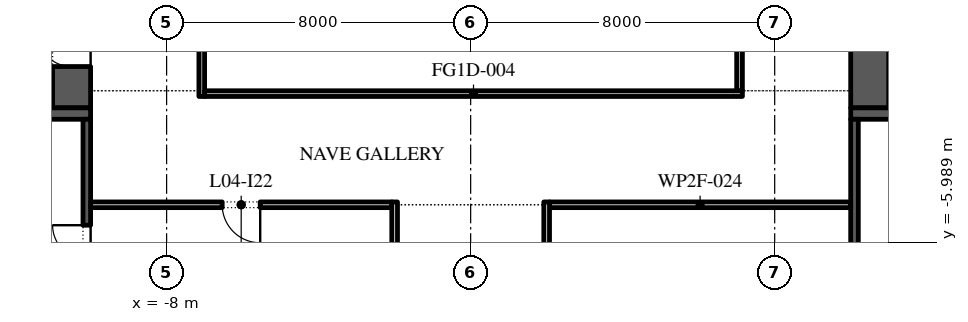
"""IFC4 building model, lengths in metres.
Left out: names, types, materials, properties, quantities, classifications, styles, units other than length and angle.
Written with IfcOpenShell. Run it as: python <this file> out.ifc"""

import sys

from ifc_helpers import new_model, si_unit, direction, frame, frame_2d, origin, place, context, subcontext, project, spatial, rectangle, extrude, element, fill, save


model = new_model("IFC4")
c1 = context("Model", 3, precision=1e-05, world=origin(), true_north=direction((0.0, 1.0)))
c2 = subcontext(c1, "Body", "Model", "MODEL_VIEW")
j1 = project(units=[si_unit("LENGTHUNIT", "METRE"), si_unit("PLANEANGLEUNIT", "RADIAN")], contexts=[c1])
p1 = place(None, origin())
s1 = spatial("IfcSite", under=j1, at=p1, CompositionType="ELEMENT")
p2 = place(p1, origin())
s2 = spatial("IfcBuilding", under=s1, at=p2, CompositionType="ELEMENT")
p3 = place(p2, frame((0.0, 0.0, 24.0)))
s3 = spatial("IfcBuildingStorey", under=s2, at=p3, CompositionType="ELEMENT", Elevation=24.0)
p4 = place(p3, frame((-7.075, -2.15, 0.0), z_axis=(0.0, 0.0, 1.0), x_axis=(0.0, 1.0, 0.0)))
e1 = element("IfcWall", 1, at=p4, inside=s3, PredefinedType="STANDARD", context=c2, shape_type="SweptSolid", body=[
    extrude(rectangle(XDim=18.3, YDim=0.15, at=frame_2d((9.15, 0.0))), origin(), (0.0, 0.0, 1.0), 4.5),
])
p5 = place(p3, frame((7.075, 16.15, 0.0), z_axis=(0.0, 0.0, 1.0), x_axis=(0.0, -1.0, 0.0)))
e2 = element("IfcWall", 2, at=p5, inside=s3, PredefinedType="STANDARD", context=c2, shape_type="SweptSolid", body=[
    extrude(rectangle(XDim=18.15, YDim=0.15, at=frame_2d((9.075, 0.0))), origin(), (0.0, 0.0, 1.0), 4.5),
])
p6 = place(p3, frame((7.15, -2.075, 0.0), z_axis=(0.0, 0.0, 1.0), x_axis=(-1.0, 0.0, 0.0)))
e3 = element("IfcWall", 3, at=p6, inside=s3, PredefinedType="STANDARD", context=c2, shape_type="SweptSolid", body=[
    extrude(rectangle(XDim=14.15, YDim=0.15, at=frame_2d((7.075, 0.0))), origin(), (0.0, 0.0, 1.0), 3.52),
])
p7 = place(p3, frame((-10.5, -2.45, 0.0), z_axis=(0.0, 0.0, 1.0), x_axis=(0.0, 1.0, 0.0)))
e4 = element("IfcWall", 4, at=p7, inside=s3, PredefinedType="SHEAR", context=c2, shape_type="SweptSolid", body=[
    extrude(rectangle(XDim=27.9, YDim=1.0, at=frame_2d((13.95, 0.0))), origin(), (0.0, 0.0, 1.0), 4.5),
])
p8 = place(p7, frame((23.65, 0.0, 0.0)))
e5 = element("IfcOpeningElement", 5, at=p8, cuts=e4, PredefinedType="OPENING", context=c2, shape_type="SweptSolid", body=[
    extrude(rectangle(XDim=2.4, YDim=2.1, at=frame_2d((1.2, 1.05))), frame((0.0, 0.51, 0.0), z_axis=(0.0, -1.0, 0.0), x_axis=(1.0, 0.0, 0.0)), (0.0, 0.0, 1.0), 1.02),
])
p9 = place(p7, frame((1.087, 0.0, 0.0)))
e6 = element("IfcOpeningElement", 6, at=p9, cuts=e4, PredefinedType="OPENING", context=c2, shape_type="SweptSolid", body=[
    extrude(rectangle(XDim=0.9, YDim=2.1, at=frame_2d((0.45, 1.05))), frame((0.0, 0.51, 0.0), z_axis=(0.0, -1.0, 0.0), x_axis=(1.0, 0.0, 0.0)), (0.0, 0.0, 1.0), 1.02),
])
p10 = place(p7, frame((4.312, 0.0, 0.0)))
e7 = element("IfcOpeningElement", 7, at=p10, cuts=e4, PredefinedType="OPENING", context=c2, shape_type="SweptSolid", body=[
    extrude(rectangle(XDim=0.9, YDim=2.1, at=frame_2d((0.45, 1.05))), frame((0.0, 0.51, 0.0), z_axis=(0.0, -1.0, 0.0), x_axis=(1.0, 0.0, 0.0)), (0.0, 0.0, 1.0), 1.02),
])
p11 = place(p3, frame((-22.0, -2.6, 0.0), z_axis=(0.0, 0.0, 1.0), x_axis=(1.0, 0.0, 0.0)))
e8 = element("IfcWall", 8, at=p11, inside=s3, PredefinedType="SHEAR", context=c2, shape_type="SweptSolid", body=[
    extrude(rectangle(XDim=12.0, YDim=0.3, at=frame_2d((6.0, 0.0))), origin(), (0.0, 0.0, 1.0), 4.5),
])
p12 = place(p3, frame((-10.1, -15.8, 0.0), z_axis=(0.0, 0.0, 1.0), x_axis=(0.0, 1.0, 0.0)))
e9 = element("IfcWall", 9, at=p12, inside=s3, PredefinedType="SHEAR", context=c2, shape_type="SweptSolid", body=[
    extrude(rectangle(XDim=13.05, YDim=0.2, at=frame_2d((6.525, 0.0))), origin(), (0.0, 0.0, 1.0), 4.5),
])
p13 = place(p12, frame((2.762, 0.0, 0.0)))
e10 = element("IfcOpeningElement", 10, at=p13, cuts=e9, PredefinedType="OPENING", context=c2, shape_type="SweptSolid", body=[
    extrude(rectangle(XDim=0.9, YDim=2.1, at=frame_2d((0.45, 1.05))), frame((0.0, 0.11, 0.0), z_axis=(0.0, -1.0, 0.0), x_axis=(1.0, 0.0, 0.0)), (0.0, 0.0, 1.0), 0.22),
])
p14 = place(p12, frame((9.363, 0.0, 0.0)))
e11 = element("IfcOpeningElement", 11, at=p14, cuts=e9, PredefinedType="OPENING", context=c2, shape_type="SweptSolid", body=[
    extrude(rectangle(XDim=0.9, YDim=2.1, at=frame_2d((0.45, 1.05))), frame((0.0, 0.11, 0.0), z_axis=(0.0, -1.0, 0.0), x_axis=(1.0, 0.0, 0.0)), (0.0, 0.0, 1.0), 0.22),
])
p15 = place(p3, frame((10.5, -2.45, 0.0), z_axis=(0.0, 0.0, 1.0), x_axis=(0.0, 1.0, 0.0)))
e12 = element("IfcWall", 12, at=p15, inside=s3, PredefinedType="SHEAR", context=c2, shape_type="SweptSolid", body=[
    extrude(rectangle(XDim=27.9, YDim=1.0, at=frame_2d((13.95, 0.0))), origin(), (0.0, 0.0, 1.0), 4.5),
])
p16 = place(p15, frame((23.65, 0.0, 0.0)))
e13 = element("IfcOpeningElement", 13, at=p16, cuts=e12, PredefinedType="OPENING", context=c2, shape_type="SweptSolid", body=[
    extrude(rectangle(XDim=2.4, YDim=2.1, at=frame_2d((1.2, 1.05))), frame((0.0, 0.51, 0.0), z_axis=(0.0, -1.0, 0.0), x_axis=(1.0, 0.0, 0.0)), (0.0, 0.0, 1.0), 1.02),
])
p17 = place(p15, frame((2.7, 0.0, 0.0)))
e14 = element("IfcOpeningElement", 14, at=p17, cuts=e12, PredefinedType="OPENING", context=c2, shape_type="SweptSolid", body=[
    extrude(rectangle(XDim=0.9, YDim=2.1, at=frame_2d((0.45, 1.05))), frame((0.0, 0.51, 0.0), z_axis=(0.0, -1.0, 0.0), x_axis=(1.0, 0.0, 0.0)), (0.0, 0.0, 1.0), 1.02),
])
p18 = place(p3, frame((10.0, -2.6, 0.0), z_axis=(0.0, 0.0, 1.0), x_axis=(1.0, 0.0, 0.0)))
e15 = element("IfcWall", 15, at=p18, inside=s3, PredefinedType="SHEAR", context=c2, shape_type="SweptSolid", body=[
    extrude(rectangle(XDim=12.0, YDim=0.3, at=frame_2d((6.0, 0.0))), origin(), (0.0, 0.0, 1.0), 4.5),
])
p19 = place(p3, frame((10.1, -15.8, 0.0), z_axis=(0.0, 0.0, 1.0), x_axis=(0.0, 1.0, 0.0)))
e16 = element("IfcWall", 16, at=p19, inside=s3, PredefinedType="SHEAR", context=c2, shape_type="SweptSolid", body=[
    extrude(rectangle(XDim=13.05, YDim=0.2, at=frame_2d((6.525, 0.0))), origin(), (0.0, 0.0, 1.0), 4.5),
])
p20 = place(p19, frame((4.462, 0.0, 0.0)))
e17 = element("IfcOpeningElement", 17, at=p20, cuts=e16, PredefinedType="OPENING", context=c2, shape_type="SweptSolid", body=[
    extrude(rectangle(XDim=0.9, YDim=2.1, at=frame_2d((0.45, 1.05))), frame((0.0, 0.11, 0.0), z_axis=(0.0, -1.0, 0.0), x_axis=(1.0, 0.0, 0.0)), (0.0, 0.0, 1.0), 0.22),
])
p21 = place(p3, frame((-10.0, -5.0, 0.0), z_axis=(0.0, 0.0, 1.0), x_axis=(1.0, 0.0, 0.0)))
e18 = element("IfcWall", 18, at=p21, inside=s3, PredefinedType="PARTITIONING", context=c2, shape_type="SweptSolid", body=[
    extrude(rectangle(XDim=7.925, YDim=0.15, at=frame_2d((3.962, 0.0))), origin(), (0.0, 0.0, 1.0), 4.5),
])
p22 = place(p21, frame((3.462, 0.0, 0.0)))
e19 = element("IfcOpeningElement", 19, at=p22, cuts=e18, PredefinedType="OPENING", context=c2, shape_type="SweptSolid", body=[
    extrude(rectangle(XDim=1.0, YDim=2.1, at=frame_2d((0.5, 1.05))), frame((0.0, 0.085, 0.0), z_axis=(0.0, -1.0, 0.0), x_axis=(1.0, 0.0, 0.0)), (0.0, 0.0, 1.0), 0.17),
])
p23 = place(p3, frame((2.075, -5.0, 0.0), z_axis=(0.0, 0.0, 1.0), x_axis=(1.0, 0.0, 0.0)))
e20 = element("IfcWall", 20, at=p23, inside=s3, PredefinedType="PARTITIONING", context=c2, shape_type="SweptSolid", body=[
    extrude(rectangle(XDim=7.925, YDim=0.15, at=frame_2d((3.962, 0.0))), origin(), (0.0, 0.0, 1.0), 4.5),
])
p24 = place(p3, frame((-2.0, -12.0, 0.0), z_axis=(0.0, 0.0, 1.0), x_axis=(0.0, 1.0, 0.0)))
e21 = element("IfcWall", 21, at=p24, inside=s3, PredefinedType="PARTITIONING", context=c2, shape_type="SweptSolid", body=[
    extrude(rectangle(XDim=7.075, YDim=0.15, at=frame_2d((3.538, 0.0))), origin(), (0.0, 0.0, 1.0), 4.5),
])
p25 = place(p3, frame((2.0, -14.0, 0.0), z_axis=(0.0, 0.0, 1.0), x_axis=(0.0, 1.0, 0.0)))
e22 = element("IfcWall", 22, at=p25, inside=s3, PredefinedType="PARTITIONING", context=c2, shape_type="SweptSolid", body=[
    extrude(rectangle(XDim=9.075, YDim=0.15, at=frame_2d((4.538, 0.0))), origin(), (0.0, 0.0, 1.0), 4.5),
])
p26 = place(p25, frame((4.038, 0.0, 0.0)))
e23 = element("IfcOpeningElement", 23, at=p26, cuts=e22, PredefinedType="OPENING", context=c2, shape_type="SweptSolid", body=[
    extrude(rectangle(XDim=1.0, YDim=2.1, at=frame_2d((0.5, 1.05))), frame((0.0, 0.085, 0.0), z_axis=(0.0, -1.0, 0.0), x_axis=(1.0, 0.0, 0.0)), (0.0, 0.0, 1.0), 0.17),
])
p27 = place(p9, origin())
e24 = element("IfcDoor", 24, at=p27, inside=s3, OperationType="SINGLE_SWING_LEFT", PredefinedType="DOOR", context=c2, shape_type="SweptSolid", body=[
    extrude(rectangle(XDim=0.9, YDim=2.1, at=frame_2d((0.45, 1.05))), frame((0.0, 0.5, 0.0), z_axis=(0.0, -1.0, 0.0), x_axis=(1.0, 0.0, 0.0)), (0.0, 0.0, 1.0), 0.05),
])
fill(e6, e24)
p28 = place(p14, origin())
e25 = element("IfcDoor", 25, at=p28, inside=s3, OperationType="SINGLE_SWING_LEFT", PredefinedType="DOOR", context=c2, shape_type="SweptSolid", body=[
    extrude(rectangle(XDim=0.9, YDim=2.1, at=frame_2d((0.45, 1.05))), frame((0.0, 0.1, 0.0), z_axis=(0.0, -1.0, 0.0), x_axis=(1.0, 0.0, 0.0)), (0.0, 0.0, 1.0), 0.05),
])
fill(e11, e25)
p29 = place(p22, frame((1.0, 0.0, 0.0), z_axis=(0.0, 0.0, 1.0), x_axis=(-1.0, 0.0, 0.0)))
e26 = element("IfcDoor", 26, at=p29, inside=s3, OperationType="SINGLE_SWING_RIGHT", PredefinedType="DOOR", context=c2, shape_type="SweptSolid", body=[
    extrude(rectangle(XDim=1.0, YDim=2.1, at=frame_2d((0.5, 1.05))), frame((0.0, 0.025, 0.0), z_axis=(0.0, -1.0, 0.0), x_axis=(1.0, 0.0, 0.0)), (0.0, 0.0, 1.0), 0.05),
])
fill(e19, e26)
save(model, sys.argv[1])
